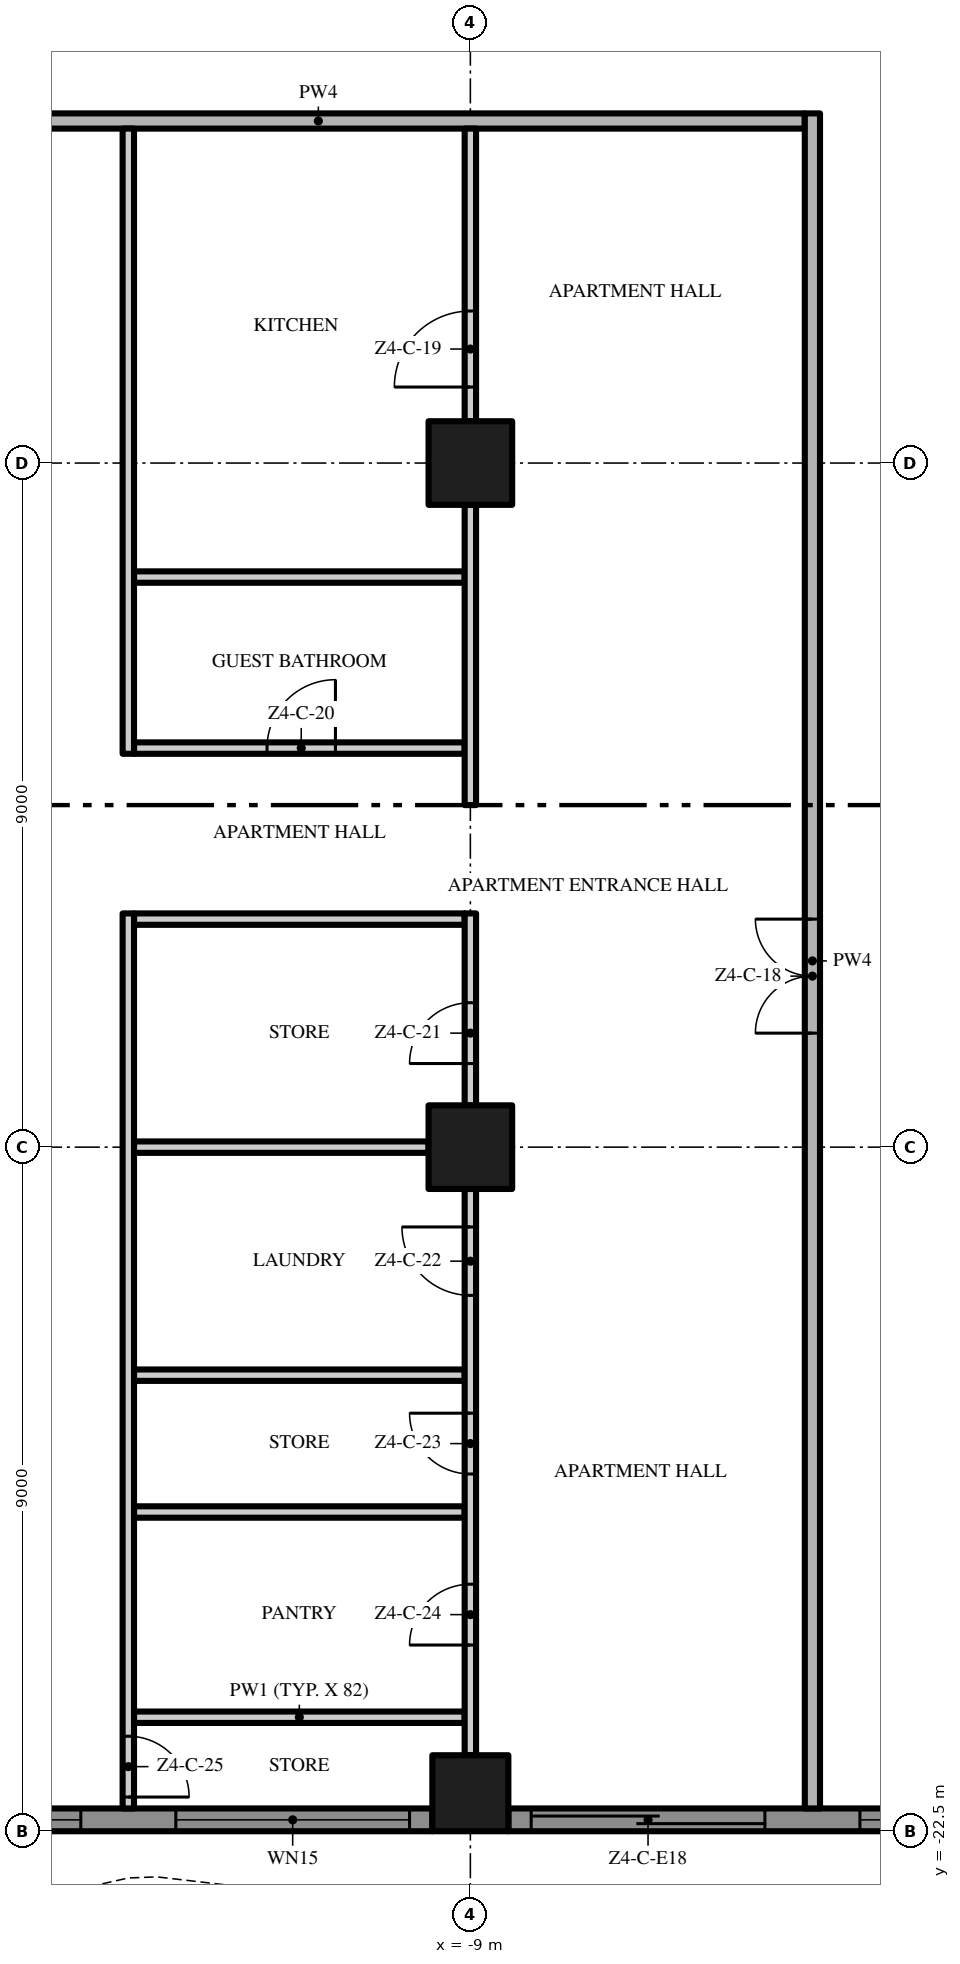
"""IFC4 building model, lengths in metres.
Left out: names, types, materials, properties, quantities, classifications, styles, units other than length and angle.
Written with IfcOpenShell. Run it as: python <this file> out.ifc"""

import sys

from ifc_helpers import new_model, si_unit, direction, frame, frame_2d, origin, origin_2d, place, context, subcontext, project, spatial, polyline, rectangle, outline, extrude, element, fill, save


model = new_model("IFC4")
c1 = context("Model", 3, precision=1e-05, world=origin(), true_north=direction((0.0, 1.0)))
c2 = subcontext(c1, "Body", "Model", "MODEL_VIEW")
j1 = project(units=[si_unit("LENGTHUNIT", "METRE"), si_unit("PLANEANGLEUNIT", "RADIAN")], contexts=[c1])
p1 = place(None, origin())
s1 = spatial("IfcSite", under=j1, at=p1, CompositionType="ELEMENT")
p2 = place(p1, origin())
s2 = spatial("IfcBuilding", under=s1, at=p2, CompositionType="ELEMENT")
p3 = place(p2, frame((0.0, 0.0, 214.8)))
s3 = spatial("IfcBuildingStorey", under=s2, at=p3, CompositionType="ELEMENT", Elevation=214.8)
p4 = place(p3, frame((-9.0, -13.5, 0.0), z_axis=(0.0, 0.0, 1.0), x_axis=(1.0, 0.0, 0.0)))
e1 = element("IfcColumn", 1, at=p4, inside=s3, PredefinedType="COLUMN", context=c2, shape_type="SweptSolid", body=[
    extrude(rectangle(XDim=1.1, YDim=1.1, at=origin_2d()), origin(), (0.0, 0.0, 1.0), 3.5),
])
p5 = place(p3, frame((-9.0, -22.0, 0.0), z_axis=(0.0, 0.0, 1.0), x_axis=(1.0, 0.0, 0.0)))
e2 = element("IfcColumn", 2, at=p5, inside=s3, PredefinedType="COLUMN", context=c2, shape_type="SweptSolid", body=[
    extrude(rectangle(XDim=1.0, YDim=1.0, at=origin_2d()), origin(), (0.0, 0.0, 1.0), 3.5),
])
p6 = place(p3, frame((-9.0, -4.5, 0.0), z_axis=(0.0, 0.0, 1.0), x_axis=(1.0, 0.0, 0.0)))
e3 = element("IfcColumn", 3, at=p6, inside=s3, PredefinedType="COLUMN", context=c2, shape_type="SweptSolid", body=[
    extrude(rectangle(XDim=1.1, YDim=1.1, at=origin_2d()), origin(), (0.0, 0.0, 1.0), 3.5),
])
p7 = place(p3, frame((-9.5, -22.35, 0.0), z_axis=(0.0, 0.0, 1.0), x_axis=(-1.0, 0.0, 0.0)))
e4 = element("IfcWall", 4, at=p7, inside=s3, PredefinedType="SOLIDWALL", context=c2, shape_type="SweptSolid", body=[
    extrude(rectangle(XDim=8.0, YDim=0.3, at=frame_2d((4.0, 0.0))), origin(), (0.0, 0.0, 1.0), 3.5),
])
p8 = place(p7, frame((4.625, 0.0, 0.45)))
e5 = element("IfcOpeningElement", 5, at=p8, cuts=e4, PredefinedType="OPENING", context=c2, shape_type="SweptSolid", body=[
    extrude(rectangle(XDim=3.075, YDim=2.65, at=frame_2d((1.538, 1.325))), frame((0.0, 0.16, 0.0), z_axis=(0.0, -1.0, 0.0), x_axis=(1.0, 0.0, 0.0)), (0.0, 0.0, 1.0), 0.32),
])
p9 = place(p7, frame((0.3, 0.0, 0.45)))
e6 = element("IfcOpeningElement", 6, at=p9, cuts=e4, PredefinedType="OPENING", context=c2, shape_type="SweptSolid", body=[
    extrude(rectangle(XDim=3.075, YDim=2.65, at=frame_2d((1.538, 1.325))), frame((0.0, 0.16, 0.0), z_axis=(0.0, -1.0, 0.0), x_axis=(1.0, 0.0, 0.0)), (0.0, 0.0, 1.0), 0.32),
])
p10 = place(p3, frame((-0.5, -22.35, 0.0), z_axis=(0.0, 0.0, 1.0), x_axis=(-1.0, 0.0, 0.0)))
e7 = element("IfcWall", 7, at=p10, inside=s3, PredefinedType="SOLIDWALL", context=c2, shape_type="SweptSolid", body=[
    extrude(rectangle(XDim=8.0, YDim=0.3, at=frame_2d((4.0, 0.0))), origin(), (0.0, 0.0, 1.0), 3.5),
])
p11 = place(p10, frame((4.625, 0.0, 0.0)))
e8 = element("IfcOpeningElement", 8, at=p11, cuts=e7, PredefinedType="OPENING", context=c2, shape_type="SweptSolid", body=[
    extrude(rectangle(XDim=3.075, YDim=2.4, at=frame_2d((1.538, 1.2))), frame((0.0, 0.16, 0.0), z_axis=(0.0, -1.0, 0.0), x_axis=(1.0, 0.0, 0.0)), (0.0, 0.0, 1.0), 0.32),
])
p12 = place(p10, frame((0.3, 0.0, 0.45)))
e9 = element("IfcOpeningElement", 9, at=p12, cuts=e7, PredefinedType="OPENING", context=c2, shape_type="SweptSolid", body=[
    extrude(rectangle(XDim=3.075, YDim=2.65, at=frame_2d((1.538, 1.325))), frame((0.0, 0.16, 0.0), z_axis=(0.0, -1.0, 0.0), x_axis=(1.0, 0.0, 0.0)), (0.0, 0.0, 1.0), 0.32),
])
p13 = place(p3, origin())
e10 = element("IfcWall", 10, at=p13, inside=s3, PredefinedType="USERDEFINED", context=c2, shape_type="SweptSolid", body=[
    extrude(outline(polyline([(-22.5, -25.149), (-21.0, -25.485), (-20.625, -25.5), (-19.5, -25.369), (-18.0, -24.845), (-16.5, -24.112), (-15.0, -23.451), (-13.5, -23.115), (-13.125, -23.1), (-12.0, -23.231), (-10.5, -23.755), (-9.0, -24.488), (-7.5, -25.149), (-6.0, -25.485), (-5.625, -25.5), (-4.5, -25.369), (-3.0, -24.845), (-1.5, -24.112), (0.0, -23.451), (1.5, -23.115), (1.875, -23.1), (3.0, -23.231), (4.5, -23.755), (6.0, -24.488), (7.5, -25.149), (9.0, -25.485), (9.375, -25.5), (10.5, -25.369), (12.0, -24.845), (13.5, -24.112), (15.0, -23.451), (16.5, -23.115), (16.875, -23.1), (18.0, -23.231), (19.5, -23.755), (21.0, -24.488), (22.5, -25.149), (22.601, -24.92), (21.105, -24.261), (19.596, -23.524), (18.056, -22.986), (16.885, -22.849), (16.467, -22.866), (14.921, -23.213), (13.395, -23.885), (11.904, -24.614), (10.444, -25.124), (9.365, -25.249), (9.033, -25.236), (7.579, -24.91), (6.105, -24.261), (4.596, -23.524), (3.056, -22.986), (1.885, -22.849), (1.467, -22.866), (-0.079, -23.213), (-1.605, -23.885), (-3.096, -24.614), (-4.556, -25.124), (-5.635, -25.249), (-5.967, -25.236), (-7.421, -24.91), (-8.895, -24.261), (-10.404, -23.524), (-11.944, -22.986), (-13.115, -22.849), (-13.533, -22.866), (-15.079, -23.213), (-16.605, -23.885), (-18.096, -24.614), (-19.556, -25.124), (-20.635, -25.249), (-20.967, -25.236), (-22.445, -24.905), (-22.5, -25.149)])), origin(), (0.0, 0.0, 1.0), 0.9),
])
for number, where, z_axis, x_axis in (
    (11, (-13.425, -21.0, 0.0), (0.0, 0.0, 1.0), (1.0, 0.0, 0.0)),
    (12, (-13.425, -18.3, 0.0), (0.0, 0.0, 1.0), (1.0, 0.0, 0.0)),
    (13, (-13.425, -16.5, 0.0), (0.0, 0.0, 1.0), (1.0, 0.0, 0.0)),
):
    element("IfcWall", number, at=place(p3, frame(where, z_axis=z_axis, x_axis=x_axis)), inside=s3, PredefinedType="PARTITIONING", context=c2, shape_type="SweptSolid", body=[
        extrude(rectangle(XDim=4.35, YDim=0.15, at=frame_2d((2.175, 0.0))), origin(), (0.0, 0.0, 1.0), 3.5),
    ])
p14 = place(p3, frame((-13.425, -13.5, 0.0), z_axis=(0.0, 0.0, 1.0), x_axis=(1.0, 0.0, 0.0)))
e14 = element("IfcWall", 14, at=p14, inside=s3, PredefinedType="PARTITIONING", context=c2, shape_type="SweptSolid", body=[
    extrude(rectangle(XDim=3.875, YDim=0.15, at=frame_2d((1.938, 0.0))), origin(), (0.0, 0.0, 1.0), 3.5),
])
p15 = place(p3, frame((-13.425, -10.5, 0.0), z_axis=(0.0, 0.0, 1.0), x_axis=(1.0, 0.0, 0.0)))
e15 = element("IfcWall", 15, at=p15, inside=s3, PredefinedType="PARTITIONING", context=c2, shape_type="SweptSolid", body=[
    extrude(rectangle(XDim=4.35, YDim=0.15, at=frame_2d((2.175, 0.0))), origin(), (0.0, 0.0, 1.0), 3.5),
])
p16 = place(p3, frame((-13.425, -8.25, 0.0), z_axis=(0.0, 0.0, 1.0), x_axis=(1.0, 0.0, 0.0)))
e16 = element("IfcWall", 16, at=p16, inside=s3, PredefinedType="PARTITIONING", context=c2, shape_type="SweptSolid", body=[
    extrude(rectangle(XDim=4.35, YDim=0.15, at=frame_2d((2.175, 0.0))), origin(), (0.0, 0.0, 1.0), 3.5),
])
p17 = place(p16, frame((1.75, 0.0, 0.0)))
e17 = element("IfcOpeningElement", 17, at=p17, cuts=e16, PredefinedType="OPENING", context=c2, shape_type="SweptSolid", body=[
    extrude(rectangle(XDim=0.9, YDim=2.1, at=frame_2d((0.45, 1.05))), frame((0.0, 0.085, 0.0), z_axis=(0.0, -1.0, 0.0), x_axis=(1.0, 0.0, 0.0)), (0.0, 0.0, 1.0), 0.17),
])
p18 = place(p3, frame((-13.425, -6.0, 0.0), z_axis=(0.0, 0.0, 1.0), x_axis=(1.0, 0.0, 0.0)))
e18 = element("IfcWall", 18, at=p18, inside=s3, PredefinedType="PARTITIONING", context=c2, shape_type="SweptSolid", body=[
    extrude(rectangle(XDim=4.35, YDim=0.15, at=frame_2d((2.175, 0.0))), origin(), (0.0, 0.0, 1.0), 3.5),
])
p19 = place(p3, frame((-17.4, 0.0, 0.0), z_axis=(0.0, 0.0, 1.0), x_axis=(1.0, 0.0, 0.0)))
e19 = element("IfcWall", 19, at=p19, inside=s3, PredefinedType="PARTITIONING", context=c2, shape_type="SweptSolid", body=[
    extrude(rectangle(XDim=12.8, YDim=0.2, at=frame_2d((6.4, 0.0))), origin(), (0.0, 0.0, 1.0), 3.5),
])
p20 = place(p3, frame((-13.5, -10.425, 0.0), z_axis=(0.0, 0.0, 1.0), x_axis=(0.0, -1.0, 0.0)))
e20 = element("IfcWall", 20, at=p20, inside=s3, PredefinedType="PARTITIONING", context=c2, shape_type="SweptSolid", body=[
    extrude(rectangle(XDim=11.775, YDim=0.15, at=frame_2d((5.888, 0.0))), origin(), (0.0, 0.0, 1.0), 3.5),
])
p21 = place(p20, frame((10.825, 0.0, 0.0)))
e21 = element("IfcOpeningElement", 21, at=p21, cuts=e20, PredefinedType="OPENING", context=c2, shape_type="SweptSolid", body=[
    extrude(rectangle(XDim=0.8, YDim=2.0, at=frame_2d((0.4, 1.0))), frame((0.0, 0.085, 0.0), z_axis=(0.0, -1.0, 0.0), x_axis=(1.0, 0.0, 0.0)), (0.0, 0.0, 1.0), 0.17),
])
p22 = place(p3, frame((-13.5, -8.325, 0.0), z_axis=(0.0, 0.0, 1.0), x_axis=(0.0, 1.0, 0.0)))
e22 = element("IfcWall", 22, at=p22, inside=s3, PredefinedType="PARTITIONING", context=c2, shape_type="SweptSolid", body=[
    extrude(rectangle(XDim=8.225, YDim=0.15, at=frame_2d((4.112, 0.0))), origin(), (0.0, 0.0, 1.0), 3.5),
])
p23 = place(p3, frame((-9.0, -21.5, 0.0), z_axis=(0.0, 0.0, 1.0), x_axis=(0.0, 1.0, 0.0)))
e23 = element("IfcWall", 23, at=p23, inside=s3, PredefinedType="PARTITIONING", context=c2, shape_type="SweptSolid", body=[
    extrude(rectangle(XDim=7.45, YDim=0.15, at=frame_2d((3.725, 0.0))), origin(), (0.0, 0.0, 1.0), 3.5),
])
p24 = place(p23, frame((6.05, 0.0, 0.0)))
e24 = element("IfcOpeningElement", 24, at=p24, cuts=e23, PredefinedType="OPENING", context=c2, shape_type="SweptSolid", body=[
    extrude(rectangle(XDim=0.9, YDim=2.1, at=frame_2d((0.45, 1.05))), frame((0.0, 0.085, 0.0), z_axis=(0.0, -1.0, 0.0), x_axis=(1.0, 0.0, 0.0)), (0.0, 0.0, 1.0), 0.17),
])
p25 = place(p23, frame((3.7, 0.0, 0.0)))
e25 = element("IfcOpeningElement", 25, at=p25, cuts=e23, PredefinedType="OPENING", context=c2, shape_type="SweptSolid", body=[
    extrude(rectangle(XDim=0.8, YDim=2.0, at=frame_2d((0.4, 1.0))), frame((0.0, 0.085, 0.0), z_axis=(0.0, -1.0, 0.0), x_axis=(1.0, 0.0, 0.0)), (0.0, 0.0, 1.0), 0.17),
])
p26 = place(p23, frame((1.45, 0.0, 0.0)))
e26 = element("IfcOpeningElement", 26, at=p26, cuts=e23, PredefinedType="OPENING", context=c2, shape_type="SweptSolid", body=[
    extrude(rectangle(XDim=0.8, YDim=2.0, at=frame_2d((0.4, 1.0))), frame((0.0, 0.085, 0.0), z_axis=(0.0, -1.0, 0.0), x_axis=(1.0, 0.0, 0.0)), (0.0, 0.0, 1.0), 0.17),
])
p27 = place(p3, frame((-9.0, -12.95, 0.0), z_axis=(0.0, 0.0, 1.0), x_axis=(0.0, 1.0, 0.0)))
e27 = element("IfcWall", 27, at=p27, inside=s3, PredefinedType="PARTITIONING", context=c2, shape_type="SweptSolid", body=[
    extrude(rectangle(XDim=2.525, YDim=0.15, at=frame_2d((1.262, 0.0))), origin(), (0.0, 0.0, 1.0), 3.5),
])
p28 = place(p27, frame((0.55, 0.0, 0.0)))
e28 = element("IfcOpeningElement", 28, at=p28, cuts=e27, PredefinedType="OPENING", context=c2, shape_type="SweptSolid", body=[
    extrude(rectangle(XDim=0.8, YDim=2.0, at=frame_2d((0.4, 1.0))), frame((0.0, 0.085, 0.0), z_axis=(0.0, -1.0, 0.0), x_axis=(1.0, 0.0, 0.0)), (0.0, 0.0, 1.0), 0.17),
])
p29 = place(p3, frame((-9.0, -9.0, 0.0), z_axis=(0.0, 0.0, 1.0), x_axis=(0.0, 1.0, 0.0)))
e29 = element("IfcWall", 29, at=p29, inside=s3, PredefinedType="PARTITIONING", context=c2, shape_type="SweptSolid", body=[
    extrude(rectangle(XDim=3.95, YDim=0.15, at=frame_2d((1.975, 0.0))), origin(), (0.0, 0.0, 1.0), 3.5),
])
p30 = place(p3, frame((-9.0, -3.95, 0.0), z_axis=(0.0, 0.0, 1.0), x_axis=(0.0, 1.0, 0.0)))
e30 = element("IfcWall", 30, at=p30, inside=s3, PredefinedType="PARTITIONING", context=c2, shape_type="SweptSolid", body=[
    extrude(rectangle(XDim=3.85, YDim=0.15, at=frame_2d((1.925, 0.0))), origin(), (0.0, 0.0, 1.0), 3.5),
])
p31 = place(p30, frame((0.45, 0.0, 0.0)))
e31 = element("IfcOpeningElement", 31, at=p31, cuts=e30, PredefinedType="OPENING", context=c2, shape_type="SweptSolid", body=[
    extrude(rectangle(XDim=1.0, YDim=2.4, at=frame_2d((0.5, 1.2))), frame((0.0, 0.085, 0.0), z_axis=(0.0, -1.0, 0.0), x_axis=(1.0, 0.0, 0.0)), (0.0, 0.0, 1.0), 0.17),
])
p32 = place(p3, frame((-4.5, -22.2, 0.0), z_axis=(0.0, 0.0, 1.0), x_axis=(0.0, 1.0, 0.0)))
e32 = element("IfcWall", 32, at=p32, inside=s3, PredefinedType="PARTITIONING", context=c2, shape_type="SweptSolid", body=[
    extrude(rectangle(XDim=22.3, YDim=0.2, at=frame_2d((11.15, 0.0))), origin(), (0.0, 0.0, 1.0), 3.5),
])
p33 = place(p32, frame((10.2, 0.0, 0.0)))
e33 = element("IfcOpeningElement", 33, at=p33, cuts=e32, PredefinedType="OPENING", context=c2, shape_type="SweptSolid", body=[
    extrude(rectangle(XDim=1.5, YDim=2.4, at=frame_2d((0.75, 1.2))), frame((0.0, 0.11, 0.0), z_axis=(0.0, -1.0, 0.0), x_axis=(1.0, 0.0, 0.0)), (0.0, 0.0, 1.0), 0.22),
])
p34 = place(p8, origin())
e34 = element("IfcWindow", 34, at=p34, inside=s3, PartitioningType="SINGLE_PANEL", PredefinedType="WINDOW", context=c2, shape_type="SweptSolid", body=[
    extrude(rectangle(XDim=3.075, YDim=2.65, at=frame_2d((1.538, 1.325))), frame((0.0, 0.03, 0.0), z_axis=(0.0, -1.0, 0.0), x_axis=(1.0, 0.0, 0.0)), (0.0, 0.0, 1.0), 0.06),
])
fill(e5, e34)
p35 = place(p9, origin())
e35 = element("IfcWindow", 35, at=p35, inside=s3, PartitioningType="SINGLE_PANEL", PredefinedType="WINDOW", context=c2, shape_type="SweptSolid", body=[
    extrude(rectangle(XDim=3.075, YDim=2.65, at=frame_2d((1.538, 1.325))), frame((0.0, 0.03, 0.0), z_axis=(0.0, -1.0, 0.0), x_axis=(1.0, 0.0, 0.0)), (0.0, 0.0, 1.0), 0.06),
])
fill(e6, e35)
p36 = place(p11, origin())
e36 = element("IfcDoor", 36, at=p36, inside=s3, OperationType="SINGLE_SWING_LEFT", PredefinedType="DOOR", context=c2, shape_type="SweptSolid", body=[
    extrude(rectangle(XDim=3.075, YDim=2.4, at=frame_2d((1.538, 1.2))), frame((0.0, 0.025, 0.0), z_axis=(0.0, -1.0, 0.0), x_axis=(1.0, 0.0, 0.0)), (0.0, 0.0, 1.0), 0.05),
])
fill(e8, e36)
p37 = place(p12, origin())
e37 = element("IfcWindow", 37, at=p37, inside=s3, PartitioningType="SINGLE_PANEL", PredefinedType="WINDOW", context=c2, shape_type="SweptSolid", body=[
    extrude(rectangle(XDim=3.075, YDim=2.65, at=frame_2d((1.538, 1.325))), frame((0.0, 0.03, 0.0), z_axis=(0.0, -1.0, 0.0), x_axis=(1.0, 0.0, 0.0)), (0.0, 0.0, 1.0), 0.06),
])
fill(e9, e37)
p38 = place(p33, origin())
e38 = element("IfcDoor", 38, at=p38, inside=s3, OperationType="DOUBLE_DOOR_SINGLE_SWING", PredefinedType="DOOR", context=c2, shape_type="SweptSolid", body=[
    extrude(rectangle(XDim=1.5, YDim=2.4, at=frame_2d((0.75, 1.2))), frame((0.0, 0.025, 0.0), z_axis=(0.0, -1.0, 0.0), x_axis=(1.0, 0.0, 0.0)), (0.0, 0.0, 1.0), 0.05),
])
fill(e33, e38)
p39 = place(p31, origin())
e39 = element("IfcDoor", 39, at=p39, inside=s3, OperationType="SINGLE_SWING_LEFT", PredefinedType="DOOR", context=c2, shape_type="SweptSolid", body=[
    extrude(rectangle(XDim=1.0, YDim=2.4, at=frame_2d((0.5, 1.2))), frame((0.0, 0.025, 0.0), z_axis=(0.0, -1.0, 0.0), x_axis=(1.0, 0.0, 0.0)), (0.0, 0.0, 1.0), 0.05),
])
fill(e31, e39)
p40 = place(p17, origin())
e40 = element("IfcDoor", 40, at=p40, inside=s3, OperationType="SINGLE_SWING_RIGHT", PredefinedType="DOOR", context=c2, shape_type="SweptSolid", body=[
    extrude(rectangle(XDim=0.9, YDim=2.1, at=frame_2d((0.45, 1.05))), frame((0.0, 0.025, 0.0), z_axis=(0.0, -1.0, 0.0), x_axis=(1.0, 0.0, 0.0)), (0.0, 0.0, 1.0), 0.05),
])
fill(e17, e40)
p41 = place(p28, origin())
e41 = element("IfcDoor", 41, at=p41, inside=s3, OperationType="SINGLE_SWING_LEFT", PredefinedType="DOOR", context=c2, shape_type="SweptSolid", body=[
    extrude(rectangle(XDim=0.8, YDim=2.0, at=frame_2d((0.4, 1.0))), frame((0.0, 0.025, 0.0), z_axis=(0.0, -1.0, 0.0), x_axis=(1.0, 0.0, 0.0)), (0.0, 0.0, 1.0), 0.05),
])
fill(e28, e41)
p42 = place(p24, origin())
e42 = element("IfcDoor", 42, at=p42, inside=s3, OperationType="SINGLE_SWING_RIGHT", PredefinedType="DOOR", context=c2, shape_type="SweptSolid", body=[
    extrude(rectangle(XDim=0.9, YDim=2.1, at=frame_2d((0.45, 1.05))), frame((0.0, 0.025, 0.0), z_axis=(0.0, -1.0, 0.0), x_axis=(1.0, 0.0, 0.0)), (0.0, 0.0, 1.0), 0.05),
])
fill(e24, e42)
p43 = place(p25, origin())
e43 = element("IfcDoor", 43, at=p43, inside=s3, OperationType="SINGLE_SWING_RIGHT", PredefinedType="DOOR", context=c2, shape_type="SweptSolid", body=[
    extrude(rectangle(XDim=0.8, YDim=2.0, at=frame_2d((0.4, 1.0))), frame((0.0, 0.025, 0.0), z_axis=(0.0, -1.0, 0.0), x_axis=(1.0, 0.0, 0.0)), (0.0, 0.0, 1.0), 0.05),
])
fill(e25, e43)
p44 = place(p26, origin())
e44 = element("IfcDoor", 44, at=p44, inside=s3, OperationType="SINGLE_SWING_LEFT", PredefinedType="DOOR", context=c2, shape_type="SweptSolid", body=[
    extrude(rectangle(XDim=0.8, YDim=2.0, at=frame_2d((0.4, 1.0))), frame((0.0, 0.025, 0.0), z_axis=(0.0, -1.0, 0.0), x_axis=(1.0, 0.0, 0.0)), (0.0, 0.0, 1.0), 0.05),
])
fill(e26, e44)
p45 = place(p21, origin())
e45 = element("IfcDoor", 45, at=p45, inside=s3, OperationType="SINGLE_SWING_RIGHT", PredefinedType="DOOR", context=c2, shape_type="SweptSolid", body=[
    extrude(rectangle(XDim=0.8, YDim=2.0, at=frame_2d((0.4, 1.0))), frame((0.0, 0.025, 0.0), z_axis=(0.0, -1.0, 0.0), x_axis=(1.0, 0.0, 0.0)), (0.0, 0.0, 1.0), 0.05),
])
fill(e21, e45)
save(model, sys.argv[1])
